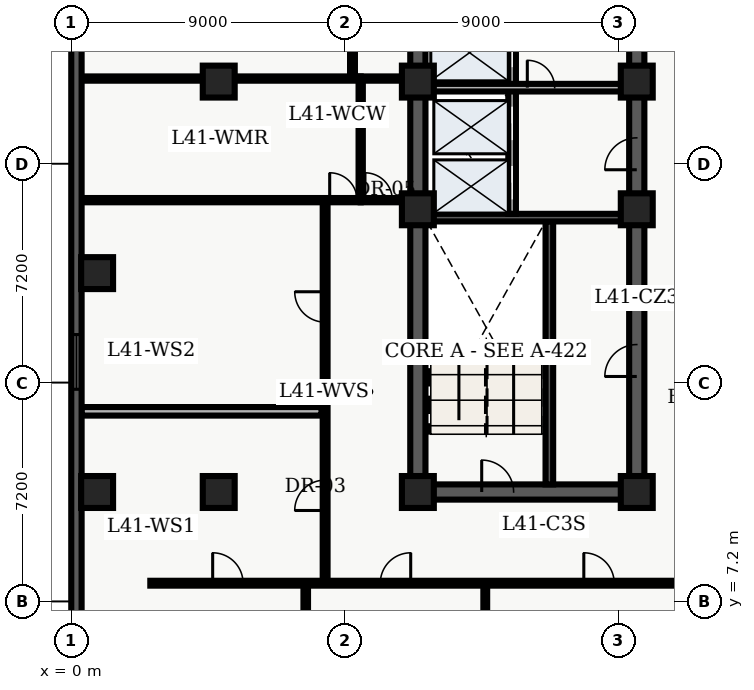
"""IFC4 building model, lengths in metres.
Left out: names, types, materials, properties, quantities, classifications, styles, units other than length and angle.
Written with IfcOpenShell. Run it as: python <this file> out.ifc"""

import sys

from ifc_helpers import new_model, entity, si_unit, converted_unit, direction, frame, origin_with_axes, origin_2d_with_axis, place, context, subcontext, project, spatial, polyline, rectangle, outline, extrude, element, fill, save


model = new_model("IFC4")
c1 = context("Model", 3, precision=1e-05, world=origin_with_axes(), true_north=direction((0.0, 1.0)))
c2 = subcontext(c1, "Body", "Model", "MODEL_VIEW")
j1 = project(units=[si_unit("LENGTHUNIT", "METRE"), converted_unit("PLANEANGLEUNIT", "DEGREE", entity("IfcPlaneAngleMeasure", 0.017), si_unit("PLANEANGLEUNIT", "RADIAN"), dimensions=[0, 0, 0, 0, 0, 0, 0])], contexts=[c1])
p1 = place(None, origin_with_axes())
s1 = spatial("IfcSite", under=j1, at=p1, CompositionType="ELEMENT")
p2 = place(p1, origin_with_axes())
s2 = spatial("IfcBuilding", under=s1, at=p2, CompositionType="ELEMENT")
p3 = place(p2, frame((0.0, 0.0, 168.0), z_axis=(0.0, 0.0, 1.0), x_axis=(1.0, 0.0, 0.0)))
s3 = spatial("IfcBuildingStorey", under=s2, at=p3, CompositionType="ELEMENT", Elevation=168.0)
p4 = place(p3, frame((11.4, 10.8, 0.0), z_axis=(0.0, 0.0, 1.0), x_axis=(0.0, 1.0, 0.0)))
e1 = element("IfcWall", 1, at=p4, inside=s3, PredefinedType="SHEAR", context=c2, shape_type="SweptSolid", body=[
    extrude(outline(polyline([(0.0, -0.25), (27.0, -0.25), (27.0, 0.25), (0.0, 0.25), (0.0, -0.25)])), origin_with_axes(), (0.0, 0.0, 1.0), 3.66),
])
p5 = place(p3, frame((11.4, 10.8, 0.0), z_axis=(0.0, 0.0, 1.0), x_axis=(1.0, 0.0, 0.0)))
e2 = element("IfcWall", 2, at=p5, inside=s3, PredefinedType="SHEAR", context=c2, shape_type="SweptSolid", body=[
    extrude(outline(polyline([(0.0, -0.25), (7.2, -0.25), (7.2, 0.25), (0.0, 0.25), (0.0, -0.25)])), origin_with_axes(), (0.0, 0.0, 1.0), 3.66),
])
p6 = place(p5, frame((2.625, 0.0, 0.0), z_axis=(0.0, 0.0, 1.0), x_axis=(1.0, 0.0, 0.0)))
e3 = element("IfcOpeningElement", 3, at=p6, cuts=e2, PredefinedType="OPENING", context=c2, shape_type="SweptSolid", body=[
    extrude(rectangle(XDim=1.05, YDim=0.52, at=origin_2d_with_axis()), origin_with_axes(), (0.0, 0.0, 1.0), 2.15),
])
p7 = place(p3, frame((18.6, 10.8, 0.0), z_axis=(0.0, 0.0, 1.0), x_axis=(0.0, 1.0, 0.0)))
e4 = element("IfcWall", 4, at=p7, inside=s3, PredefinedType="SHEAR", context=c2, shape_type="SweptSolid", body=[
    extrude(outline(polyline([(0.0, -0.25), (13.5, -0.25), (13.5, 0.25), (0.0, 0.25), (0.0, -0.25)])), origin_with_axes(), (0.0, 0.0, 1.0), 3.66),
])
p8 = place(p7, frame((11.125, 0.0, 0.0), z_axis=(0.0, 0.0, 1.0), x_axis=(1.0, 0.0, 0.0)))
e5 = element("IfcOpeningElement", 5, at=p8, cuts=e4, PredefinedType="OPENING", context=c2, shape_type="SweptSolid", body=[
    extrude(rectangle(XDim=1.05, YDim=0.52, at=origin_2d_with_axis()), origin_with_axes(), (0.0, 0.0, 1.0), 2.15),
])
p9 = place(p7, frame((4.325, 0.0, 0.0), z_axis=(0.0, 0.0, 1.0), x_axis=(1.0, 0.0, 0.0)))
e6 = element("IfcOpeningElement", 6, at=p9, cuts=e4, PredefinedType="OPENING", context=c2, shape_type="SweptSolid", body=[
    extrude(rectangle(XDim=1.05, YDim=0.52, at=origin_2d_with_axis()), origin_with_axes(), (0.0, 0.0, 1.0), 2.15),
])
p10 = place(p3, frame((18.6, 24.3, 0.0), z_axis=(0.0, 0.0, 1.0), x_axis=(0.0, 1.0, 0.0)))
e7 = element("IfcWall", 7, at=p10, inside=s3, PredefinedType="SHEAR", context=c2, shape_type="SweptSolid", body=[
    extrude(outline(polyline([(0.0, -0.25), (13.5, -0.25), (13.5, 0.25), (0.0, 0.25), (0.0, -0.25)])), origin_with_axes(), (0.0, 0.0, 1.0), 3.66),
])
p11 = place(p10, frame((5.65, 0.0, 0.0), z_axis=(0.0, 0.0, 1.0), x_axis=(1.0, 0.0, 0.0)))
e8 = element("IfcOpeningElement", 8, at=p11, cuts=e7, PredefinedType="OPENING", context=c2, shape_type="SweptSolid", body=[
    extrude(rectangle(XDim=1.1, YDim=0.52, at=origin_2d_with_axis()), origin_with_axes(), (0.0, 0.0, 1.0), 2.15),
])
p12 = place(p10, frame((7.75, 0.0, 0.0), z_axis=(0.0, 0.0, 1.0), x_axis=(1.0, 0.0, 0.0)))
e9 = element("IfcOpeningElement", 9, at=p12, cuts=e7, PredefinedType="OPENING", context=c2, shape_type="SweptSolid", body=[
    extrude(rectangle(XDim=1.1, YDim=0.52, at=origin_2d_with_axis()), origin_with_axes(), (0.0, 0.0, 1.0), 2.15),
])
p13 = place(p3, frame((15.725, 11.05, 0.0), z_axis=(0.0, 0.0, 1.0), x_axis=(0.0, 1.0, 0.0)))
e10 = element("IfcWall", 10, at=p13, inside=s3, PredefinedType="SHEAR", context=c2, shape_type="SweptSolid", body=[
    extrude(outline(polyline([(0.0, -0.125), (8.65, -0.125), (8.65, 0.125), (0.0, 0.125), (0.0, -0.125)])), origin_with_axes(), (0.0, 0.0, 1.0), 3.66),
])
p14 = place(p3, frame((11.65, 19.825, 0.0), z_axis=(0.0, 0.0, 1.0), x_axis=(1.0, 0.0, 0.0)))
e11 = element("IfcWall", 11, at=p14, inside=s3, PredefinedType="SHEAR", context=c2, shape_type="SweptSolid", body=[
    extrude(outline(polyline([(0.0, -0.125), (6.7, -0.125), (6.7, 0.125), (0.0, 0.125), (0.0, -0.125)])), origin_with_axes(), (0.0, 0.0, 1.0), 3.66),
])
p15 = place(p3, frame((14.5, 19.95, 0.0), z_axis=(0.0, 0.0, 1.0), x_axis=(0.0, 1.0, 0.0)))
e12 = element("IfcWall", 12, at=p15, inside=s3, PredefinedType="SOLIDWALL", context=c2, shape_type="SweptSolid", body=[
    extrude(outline(polyline([(0.0, -0.125), (6.25, -0.125), (6.25, 0.125), (0.0, 0.125), (0.0, -0.125)])), origin_with_axes(), (0.0, 0.0, 1.0), 2.7),
])
p16 = place(p15, frame((1.025, 0.0, 0.0), z_axis=(0.0, 0.0, 1.0), x_axis=(1.0, 0.0, 0.0)))
e13 = element("IfcOpeningElement", 13, at=p16, cuts=e12, PredefinedType="OPENING", context=c2, shape_type="SweptSolid", body=[
    extrude(rectangle(XDim=1.1, YDim=0.27, at=origin_2d_with_axis()), origin_with_axes(), (0.0, 0.0, 1.0), 2.15),
])
p17 = place(p15, frame((2.975, 0.0, 0.0), z_axis=(0.0, 0.0, 1.0), x_axis=(1.0, 0.0, 0.0)))
e14 = element("IfcOpeningElement", 14, at=p17, cuts=e12, PredefinedType="OPENING", context=c2, shape_type="SweptSolid", body=[
    extrude(rectangle(XDim=1.1, YDim=0.27, at=origin_2d_with_axis()), origin_with_axes(), (0.0, 0.0, 1.0), 2.15),
])
p18 = place(p15, frame((5.425, 0.0, 0.0), z_axis=(0.0, 0.0, 1.0), x_axis=(1.0, 0.0, 0.0)))
e15 = element("IfcOpeningElement", 15, at=p18, cuts=e12, PredefinedType="OPENING", context=c2, shape_type="SweptSolid", body=[
    extrude(rectangle(XDim=1.2, YDim=0.27, at=origin_2d_with_axis()), origin_with_axes(), (0.0, 0.0, 1.0), 2.15),
])
p19 = place(p3, frame((11.7, 24.1, 0.0), z_axis=(0.0, 0.0, 1.0), x_axis=(1.0, 0.0, 0.0)))
e16 = element("IfcWall", 16, at=p19, inside=s3, PredefinedType="SOLIDWALL", context=c2, shape_type="SweptSolid", body=[
    extrude(outline(polyline([(0.0, -0.125), (6.6, -0.125), (6.6, 0.125), (0.0, 0.125), (0.0, -0.125)])), origin_with_axes(), (0.0, 0.0, 1.0), 2.7),
])
p20 = place(p19, frame((3.75, 0.0, 0.0), z_axis=(0.0, 0.0, 1.0), x_axis=(1.0, 0.0, 0.0)))
e17 = element("IfcOpeningElement", 17, at=p20, cuts=e16, PredefinedType="OPENING", context=c2, shape_type="SweptSolid", body=[
    extrude(rectangle(XDim=0.9, YDim=0.27, at=origin_2d_with_axis()), origin_with_axes(), (0.0, 0.0, 1.0), 2.15),
])
for number, where, z_axis, x_axis in (
    (18, (11.4, 10.8, 0.0), (0.0, 0.0, 1.0), (1.0, 0.0, 0.0)),
    (19, (11.4, 20.1, 0.0), (0.0, 0.0, 1.0), (1.0, 0.0, 0.0)),
    (20, (11.4, 24.3, 0.0), (0.0, 0.0, 1.0), (1.0, 0.0, 0.0)),
    (21, (18.6, 10.8, 0.0), (0.0, 0.0, 1.0), (1.0, 0.0, 0.0)),
    (22, (18.6, 20.1, 0.0), (0.0, 0.0, 1.0), (1.0, 0.0, 0.0)),
    (23, (18.6, 24.3, 0.0), (0.0, 0.0, 1.0), (1.0, 0.0, 0.0)),
    (24, (4.85, 10.8, 0.0), (0.0, 0.0, 1.0), (1.0, 0.0, 0.0)),
    (25, (4.85, 24.3, 0.0), (0.0, 0.0, 1.0), (1.0, 0.0, 0.0)),
    (26, (0.85, 10.8, 0.0), (0.0, 0.0, 1.0), (1.0, 0.0, 0.0)),
    (27, (0.85, 18.0, 0.0), (0.0, 0.0, 1.0), (1.0, 0.0, 0.0)),
):
    element("IfcColumn", number, at=place(p3, frame(where, z_axis=z_axis, x_axis=x_axis)), inside=s3, PredefinedType="COLUMN", context=c2, shape_type="SweptSolid", body=[
        extrude(rectangle(XDim=1.05, YDim=1.05, at=origin_2d_with_axis()), origin_with_axes(), (0.0, 0.0, 1.0), 3.9),
    ])
p21 = place(p3, frame((9.52, 20.4, 0.0), z_axis=(0.0, 0.0, 1.0), x_axis=(0.0, 1.0, 0.0)))
e28 = element("IfcWall", 28, at=p21, inside=s3, PredefinedType="PARTITIONING", context=c2, shape_type="SweptSolid", body=[
    extrude(outline(polyline([(0.0, -0.07), (4.0, -0.07), (4.0, 0.07), (0.0, 0.07), (0.0, -0.07)])), origin_with_axes(), (0.0, 0.0, 1.0), 2.7),
])
p22 = place(p3, frame((9.52, 20.4, 0.0), z_axis=(0.0, 0.0, 1.0), x_axis=(1.0, 0.0, 0.0)))
e29 = element("IfcWall", 29, at=p22, inside=s3, PredefinedType="PARTITIONING", context=c2, shape_type="SweptSolid", body=[
    extrude(outline(polyline([(0.0, -0.07), (1.58, -0.07), (1.58, 0.07), (0.0, 0.07), (0.0, -0.07)])), origin_with_axes(), (0.0, 0.0, 1.0), 2.7),
])
p23 = place(p22, frame((0.59, 0.0, 0.0), z_axis=(0.0, 0.0, 1.0), x_axis=(1.0, 0.0, 0.0)))
e30 = element("IfcOpeningElement", 30, at=p23, cuts=e29, PredefinedType="OPENING", context=c2, shape_type="SweptSolid", body=[
    extrude(rectangle(XDim=0.9, YDim=0.16, at=origin_2d_with_axis()), origin_with_axes(), (0.0, 0.0, 1.0), 2.15),
])
p24 = place(p3, frame((9.52, 24.4, 0.0), z_axis=(0.0, 0.0, 1.0), x_axis=(1.0, 0.0, 0.0)))
e31 = element("IfcWall", 31, at=p24, inside=s3, PredefinedType="PARTITIONING", context=c2, shape_type="SweptSolid", body=[
    extrude(outline(polyline([(0.0, -0.07), (1.58, -0.07), (1.58, 0.07), (0.0, 0.07), (0.0, -0.07)])), origin_with_axes(), (0.0, 0.0, 1.0), 2.7),
])
p25 = place(p3, frame((2.6, 7.8, 0.0), z_axis=(0.0, 0.0, 1.0), x_axis=(1.0, 0.0, 0.0)))
e32 = element("IfcWall", 32, at=p25, inside=s3, PredefinedType="PARTITIONING", context=c2, shape_type="SweptSolid", body=[
    extrude(outline(polyline([(0.0, -0.08), (18.55, -0.08), (18.55, 0.08), (0.0, 0.08), (0.0, -0.08)])), origin_with_axes(), (0.0, 0.0, 1.0), 2.7),
])
p26 = place(p25, frame((2.551, 0.0, 0.0), z_axis=(0.0, 0.0, 1.0), x_axis=(1.0, 0.0, 0.0)))
e33 = element("IfcOpeningElement", 33, at=p26, cuts=e32, PredefinedType="OPENING", context=c2, shape_type="SweptSolid", body=[
    extrude(rectangle(XDim=1.0, YDim=0.18, at=origin_2d_with_axis()), origin_with_axes(), (0.0, 0.0, 1.0), 2.15),
])
p27 = place(p25, frame((8.065, 0.0, 0.0), z_axis=(0.0, 0.0, 1.0), x_axis=(1.0, 0.0, 0.0)))
e34 = element("IfcOpeningElement", 34, at=p27, cuts=e32, PredefinedType="OPENING", context=c2, shape_type="SweptSolid", body=[
    extrude(rectangle(XDim=1.0, YDim=0.18, at=origin_2d_with_axis()), origin_with_axes(), (0.0, 0.0, 1.0), 2.15),
])
p28 = place(p25, frame((14.758, 0.0, 0.0), z_axis=(0.0, 0.0, 1.0), x_axis=(1.0, 0.0, 0.0)))
e35 = element("IfcOpeningElement", 35, at=p28, cuts=e32, PredefinedType="OPENING", context=c2, shape_type="SweptSolid", body=[
    extrude(rectangle(XDim=1.0, YDim=0.18, at=origin_2d_with_axis()), origin_with_axes(), (0.0, 0.0, 1.0), 2.15),
])
p29 = place(p3, frame((8.35, 7.8, 0.0), z_axis=(0.0, 0.0, 1.0), x_axis=(0.0, 1.0, 0.0)))
e36 = element("IfcWall", 36, at=p29, inside=s3, PredefinedType="PARTITIONING", context=c2, shape_type="SweptSolid", body=[
    extrude(outline(polyline([(0.0, -0.08), (12.6, -0.08), (12.6, 0.08), (0.0, 0.08), (0.0, -0.08)])), origin_with_axes(), (0.0, 0.0, 1.0), 2.7),
])
p30 = place(p29, frame((2.892, 0.0, 0.0), z_axis=(0.0, 0.0, 1.0), x_axis=(1.0, 0.0, 0.0)))
e37 = element("IfcOpeningElement", 37, at=p30, cuts=e36, PredefinedType="OPENING", context=c2, shape_type="SweptSolid", body=[
    extrude(rectangle(XDim=1.0, YDim=0.18, at=origin_2d_with_axis()), origin_with_axes(), (0.0, 0.0, 1.0), 2.15),
])
p31 = place(p29, frame((9.087, 0.0, 0.0), z_axis=(0.0, 0.0, 1.0), x_axis=(1.0, 0.0, 0.0)))
e38 = element("IfcOpeningElement", 38, at=p31, cuts=e36, PredefinedType="OPENING", context=c2, shape_type="SweptSolid", body=[
    extrude(rectangle(XDim=1.0, YDim=0.18, at=origin_2d_with_axis()), origin_with_axes(), (0.0, 0.0, 1.0), 2.15),
])
p32 = place(p3, frame((9.25, 24.4, 0.0), z_axis=(0.0, 0.0, 1.0), x_axis=(0.0, 1.0, 0.0)))
e39 = element("IfcWall", 39, at=p32, inside=s3, PredefinedType="PARTITIONING", context=c2, shape_type="SweptSolid", body=[
    extrude(outline(polyline([(0.0, -0.08), (16.1, -0.08), (16.1, 0.08), (0.0, 0.08), (0.0, -0.08)])), origin_with_axes(), (0.0, 0.0, 1.0), 2.7),
])
p33 = place(p32, frame((3.808, 0.0, 0.0), z_axis=(0.0, 0.0, 1.0), x_axis=(1.0, 0.0, 0.0)))
e40 = element("IfcOpeningElement", 40, at=p33, cuts=e39, PredefinedType="OPENING", context=c2, shape_type="SweptSolid", body=[
    extrude(rectangle(XDim=1.0, YDim=0.18, at=origin_2d_with_axis()), origin_with_axes(), (0.0, 0.0, 1.0), 2.15),
])
p34 = place(p32, frame((9.467, 0.0, 0.0), z_axis=(0.0, 0.0, 1.0), x_axis=(1.0, 0.0, 0.0)))
e41 = element("IfcOpeningElement", 41, at=p34, cuts=e39, PredefinedType="OPENING", context=c2, shape_type="SweptSolid", body=[
    extrude(rectangle(XDim=1.0, YDim=0.18, at=origin_2d_with_axis()), origin_with_axes(), (0.0, 0.0, 1.0), 2.15),
])
p35 = place(p32, frame((13.684, 0.0, 0.0), z_axis=(0.0, 0.0, 1.0), x_axis=(1.0, 0.0, 0.0)))
e42 = element("IfcOpeningElement", 42, at=p35, cuts=e39, PredefinedType="OPENING", context=c2, shape_type="SweptSolid", body=[
    extrude(rectangle(XDim=1.0, YDim=0.18, at=origin_2d_with_axis()), origin_with_axes(), (0.0, 0.0, 1.0), 2.15),
])
p36 = place(p3, frame((0.335, 20.4, 0.0), z_axis=(0.0, 0.0, 1.0), x_axis=(1.0, 0.0, 0.0)))
e43 = element("IfcWall", 43, at=p36, inside=s3, PredefinedType="PARTITIONING", context=c2, shape_type="SweptSolid", body=[
    extrude(outline(polyline([(0.0, -0.07), (9.185, -0.07), (9.185, 0.07), (0.0, 0.07), (0.0, -0.07)])), origin_with_axes(), (0.0, 0.0, 1.0), 2.7),
])
p37 = place(p36, frame((8.615, 0.0, 0.0), z_axis=(0.0, 0.0, 1.0), x_axis=(1.0, 0.0, 0.0)))
e44 = element("IfcOpeningElement", 44, at=p37, cuts=e43, PredefinedType="OPENING", context=c2, shape_type="SweptSolid", body=[
    extrude(rectangle(XDim=0.9, YDim=0.16, at=origin_2d_with_axis()), origin_with_axes(), (0.0, 0.0, 1.0), 2.15),
])
p38 = place(p3, frame((0.335, 24.4, 0.0), z_axis=(0.0, 0.0, 1.0), x_axis=(1.0, 0.0, 0.0)))
e45 = element("IfcWall", 45, at=p38, inside=s3, PredefinedType="PARTITIONING", context=c2, shape_type="SweptSolid", body=[
    extrude(outline(polyline([(0.0, -0.07), (9.185, -0.07), (9.185, 0.07), (0.0, 0.07), (0.0, -0.07)])), origin_with_axes(), (0.0, 0.0, 1.0), 2.7),
])
p39 = place(p3, frame((0.335, 13.454, 0.0), z_axis=(0.0, 0.0, 1.0), x_axis=(1.0, 0.0, 0.0)))
e46 = element("IfcWall", 46, at=p39, inside=s3, PredefinedType="PARTITIONING", context=c2, shape_type="SweptSolid", body=[
    extrude(outline(polyline([(0.0, -0.14), (7.895, -0.14), (7.895, 0.14), (0.0, 0.14), (0.0, -0.14)])), origin_with_axes(), (0.0, 0.0, 1.0), 2.7),
])
p40 = place(p3, frame((7.712, 0.335, 0.0), z_axis=(0.0, 0.0, 1.0), x_axis=(0.0, 1.0, 0.0)))
e47 = element("IfcWall", 47, at=p40, inside=s3, PredefinedType="PARTITIONING", context=c2, shape_type="SweptSolid", body=[
    extrude(outline(polyline([(0.0, -0.075), (7.365, -0.075), (7.365, 0.075), (0.0, 0.075), (0.0, -0.075)])), origin_with_axes(), (0.0, 0.0, 1.0), 2.7),
])
p41 = place(p3, frame((13.617, 0.335, 0.0), z_axis=(0.0, 0.0, 1.0), x_axis=(0.0, 1.0, 0.0)))
e48 = element("IfcWall", 48, at=p41, inside=s3, PredefinedType="PARTITIONING", context=c2, shape_type="SweptSolid", body=[
    extrude(outline(polyline([(0.0, -0.062), (7.365, -0.062), (7.365, 0.062), (0.0, 0.062), (0.0, -0.062)])), origin_with_axes(), (0.0, 0.0, 1.0), 2.7),
])
p42 = place(p3, frame((0.17, 2.74, 0.0), z_axis=(0.0, 0.0, 1.0), x_axis=(0.0, 1.0, 0.0)))
e49 = element("IfcWall", 49, at=p42, inside=s3, PredefinedType="SOLIDWALL", context=c2, shape_type="SweptSolid", body=[
    extrude(outline(polyline([(0.0, -0.17), (43.46, -0.17), (43.46, 0.17), (0.0, 0.17), (0.0, -0.17)])), origin_with_axes(), (0.0, 0.0, 1.0), 3.66),
])
p43 = place(p42, frame((2.948, 0.0, 0.45), z_axis=(0.0, 0.0, 1.0), x_axis=(1.0, 0.0, 0.0)))
e50 = element("IfcOpeningElement", 50, at=p43, cuts=e49, PredefinedType="OPENING", context=c2, shape_type="SweptSolid", body=[
    extrude(rectangle(XDim=1.8, YDim=0.36, at=origin_2d_with_axis()), origin_with_axes(), (0.0, 0.0, 1.0), 2.1),
])
p44 = place(p42, frame((12.339, 0.0, 0.45), z_axis=(0.0, 0.0, 1.0), x_axis=(1.0, 0.0, 0.0)))
e51 = element("IfcOpeningElement", 51, at=p44, cuts=e49, PredefinedType="OPENING", context=c2, shape_type="SweptSolid", body=[
    extrude(rectangle(XDim=1.8, YDim=0.36, at=origin_2d_with_axis()), origin_with_axes(), (0.0, 0.0, 1.0), 2.1),
])
p45 = place(p42, frame((26.426, 0.0, 0.45), z_axis=(0.0, 0.0, 1.0), x_axis=(1.0, 0.0, 0.0)))
e52 = element("IfcOpeningElement", 52, at=p45, cuts=e49, PredefinedType="OPENING", context=c2, shape_type="SweptSolid", body=[
    extrude(rectangle(XDim=1.8, YDim=0.36, at=origin_2d_with_axis()), origin_with_axes(), (0.0, 0.0, 1.0), 2.1),
])
p46 = place(p42, frame((31.121, 0.0, 0.45), z_axis=(0.0, 0.0, 1.0), x_axis=(1.0, 0.0, 0.0)))
e53 = element("IfcOpeningElement", 53, at=p46, cuts=e49, PredefinedType="OPENING", context=c2, shape_type="SweptSolid", body=[
    extrude(rectangle(XDim=1.8, YDim=0.36, at=origin_2d_with_axis()), origin_with_axes(), (0.0, 0.0, 1.0), 2.1),
])
p47 = place(p42, frame((40.062, 0.0, 0.45), z_axis=(0.0, 0.0, 1.0), x_axis=(1.0, 0.0, 0.0)))
e54 = element("IfcOpeningElement", 54, at=p47, cuts=e49, PredefinedType="OPENING", context=c2, shape_type="SweptSolid", body=[
    extrude(rectangle(XDim=1.8, YDim=0.36, at=origin_2d_with_axis()), origin_with_axes(), (0.0, 0.0, 1.0), 2.1),
])
p48 = place(p15, frame((1.025, 0.0, 0.0), z_axis=(0.0, 0.0, 1.0), x_axis=(1.0, 0.0, 0.0)))
e55 = element("IfcDoor", 55, at=p48, inside=s3, OperationType="SLIDING_TO_LEFT", PredefinedType="DOOR", context=c2, shape_type="SweptSolid", body=[
    extrude(rectangle(XDim=1.1, YDim=0.09, at=origin_2d_with_axis()), origin_with_axes(), (0.0, 0.0, 1.0), 2.15),
])
fill(e13, e55)
p49 = place(p15, frame((2.975, 0.0, 0.0), z_axis=(0.0, 0.0, 1.0), x_axis=(1.0, 0.0, 0.0)))
e56 = element("IfcDoor", 56, at=p49, inside=s3, OperationType="SLIDING_TO_RIGHT", PredefinedType="DOOR", context=c2, shape_type="SweptSolid", body=[
    extrude(rectangle(XDim=1.1, YDim=0.09, at=origin_2d_with_axis()), origin_with_axes(), (0.0, 0.0, 1.0), 2.15),
])
fill(e14, e56)
p50 = place(p15, frame((5.425, 0.0, 0.0), z_axis=(0.0, 0.0, 1.0), x_axis=(1.0, 0.0, 0.0)))
e57 = element("IfcDoor", 57, at=p50, inside=s3, OperationType="DOUBLE_DOOR_SLIDING", PredefinedType="DOOR", context=c2, shape_type="SweptSolid", body=[
    extrude(rectangle(XDim=1.2, YDim=0.09, at=origin_2d_with_axis()), origin_with_axes(), (0.0, 0.0, 1.0), 2.15),
])
fill(e15, e57)
p51 = place(p5, frame((2.625, 0.0, 0.0), z_axis=(0.0, 0.0, 1.0), x_axis=(1.0, 0.0, 0.0)))
e58 = element("IfcDoor", 58, at=p51, inside=s3, OperationType="SINGLE_SWING_LEFT", PredefinedType="DOOR", context=c2, shape_type="SweptSolid", body=[
    extrude(rectangle(XDim=1.05, YDim=0.09, at=origin_2d_with_axis()), origin_with_axes(), (0.0, 0.0, 1.0), 2.15),
])
fill(e3, e58)
p52 = place(p7, frame((11.125, 0.0, 0.0), z_axis=(0.0, 0.0, 1.0), x_axis=(1.0, 0.0, 0.0)))
e59 = element("IfcDoor", 59, at=p52, inside=s3, OperationType="SINGLE_SWING_LEFT", PredefinedType="DOOR", context=c2, shape_type="SweptSolid", body=[
    extrude(rectangle(XDim=1.05, YDim=0.09, at=origin_2d_with_axis()), origin_with_axes(), (0.0, 0.0, 1.0), 2.15),
])
fill(e5, e59)
p53 = place(p19, frame((3.75, 0.0, 0.0), z_axis=(0.0, 0.0, 1.0), x_axis=(1.0, 0.0, 0.0)))
e60 = element("IfcDoor", 60, at=p53, inside=s3, OperationType="SINGLE_SWING_LEFT", PredefinedType="DOOR", context=c2, shape_type="SweptSolid", body=[
    extrude(rectangle(XDim=0.9, YDim=0.09, at=origin_2d_with_axis()), origin_with_axes(), (0.0, 0.0, 1.0), 2.15),
])
fill(e17, e60)
p54 = place(p7, frame((4.325, 0.0, 0.0), z_axis=(0.0, 0.0, 1.0), x_axis=(1.0, 0.0, 0.0)))
e61 = element("IfcDoor", 61, at=p54, inside=s3, OperationType="SINGLE_SWING_LEFT", PredefinedType="DOOR", context=c2, shape_type="SweptSolid", body=[
    extrude(rectangle(XDim=1.05, YDim=0.09, at=origin_2d_with_axis()), origin_with_axes(), (0.0, 0.0, 1.0), 2.15),
])
fill(e6, e61)
p55 = place(p22, frame((0.59, 0.0, 0.0), z_axis=(0.0, 0.0, 1.0), x_axis=(1.0, 0.0, 0.0)))
e62 = element("IfcDoor", 62, at=p55, inside=s3, OperationType="SINGLE_SWING_LEFT", PredefinedType="DOOR", context=c2, shape_type="SweptSolid", body=[
    extrude(rectangle(XDim=0.9, YDim=0.084, at=origin_2d_with_axis()), origin_with_axes(), (0.0, 0.0, 1.0), 2.15),
])
fill(e30, e62)
p56 = place(p36, frame((8.615, 0.0, 0.0), z_axis=(0.0, 0.0, 1.0), x_axis=(1.0, 0.0, 0.0)))
e63 = element("IfcDoor", 63, at=p56, inside=s3, OperationType="SINGLE_SWING_LEFT", PredefinedType="DOOR", context=c2, shape_type="SweptSolid", body=[
    extrude(rectangle(XDim=0.9, YDim=0.084, at=origin_2d_with_axis()), origin_with_axes(), (0.0, 0.0, 1.0), 2.15),
])
fill(e44, e63)
p57 = place(p29, frame((2.892, 0.0, 0.0), z_axis=(0.0, 0.0, 1.0), x_axis=(1.0, 0.0, 0.0)))
e64 = element("IfcDoor", 64, at=p57, inside=s3, OperationType="SINGLE_SWING_LEFT", PredefinedType="DOOR", context=c2, shape_type="SweptSolid", body=[
    extrude(rectangle(XDim=1.0, YDim=0.09, at=origin_2d_with_axis()), origin_with_axes(), (0.0, 0.0, 1.0), 2.15),
])
fill(e37, e64)
p58 = place(p29, frame((9.087, 0.0, 0.0), z_axis=(0.0, 0.0, 1.0), x_axis=(1.0, 0.0, 0.0)))
e65 = element("IfcDoor", 65, at=p58, inside=s3, OperationType="SINGLE_SWING_RIGHT", PredefinedType="DOOR", context=c2, shape_type="SweptSolid", body=[
    extrude(rectangle(XDim=1.0, YDim=0.09, at=origin_2d_with_axis()), origin_with_axes(), (0.0, 0.0, 1.0), 2.15),
])
fill(e38, e65)
p59 = place(p25, frame((2.551, 0.0, 0.0), z_axis=(0.0, 0.0, 1.0), x_axis=(1.0, 0.0, 0.0)))
e66 = element("IfcDoor", 66, at=p59, inside=s3, OperationType="SINGLE_SWING_LEFT", PredefinedType="DOOR", context=c2, shape_type="SweptSolid", body=[
    extrude(rectangle(XDim=1.0, YDim=0.09, at=origin_2d_with_axis()), origin_with_axes(), (0.0, 0.0, 1.0), 2.15),
])
fill(e33, e66)
p60 = place(p25, frame((8.065, 0.0, 0.0), z_axis=(0.0, 0.0, 1.0), x_axis=(1.0, 0.0, 0.0)))
e67 = element("IfcDoor", 67, at=p60, inside=s3, OperationType="SINGLE_SWING_RIGHT", PredefinedType="DOOR", context=c2, shape_type="SweptSolid", body=[
    extrude(rectangle(XDim=1.0, YDim=0.09, at=origin_2d_with_axis()), origin_with_axes(), (0.0, 0.0, 1.0), 2.15),
])
fill(e34, e67)
p61 = place(p25, frame((14.758, 0.0, 0.0), z_axis=(0.0, 0.0, 1.0), x_axis=(1.0, 0.0, 0.0)))
e68 = element("IfcDoor", 68, at=p61, inside=s3, OperationType="SINGLE_SWING_LEFT", PredefinedType="DOOR", context=c2, shape_type="SweptSolid", body=[
    extrude(rectangle(XDim=1.0, YDim=0.09, at=origin_2d_with_axis()), origin_with_axes(), (0.0, 0.0, 1.0), 2.15),
])
fill(e35, e68)
p62 = place(p42, frame((12.339, 0.0, 0.45), z_axis=(0.0, 0.0, 1.0), x_axis=(1.0, 0.0, 0.0)))
e69 = element("IfcWindow", 69, at=p62, inside=s3, PredefinedType="WINDOW", context=c2, shape_type="SweptSolid", body=[
    extrude(rectangle(XDim=1.8, YDim=0.09, at=origin_2d_with_axis()), origin_with_axes(), (0.0, 0.0, 1.0), 2.1),
])
fill(e51, e69)
save(model, sys.argv[1])
